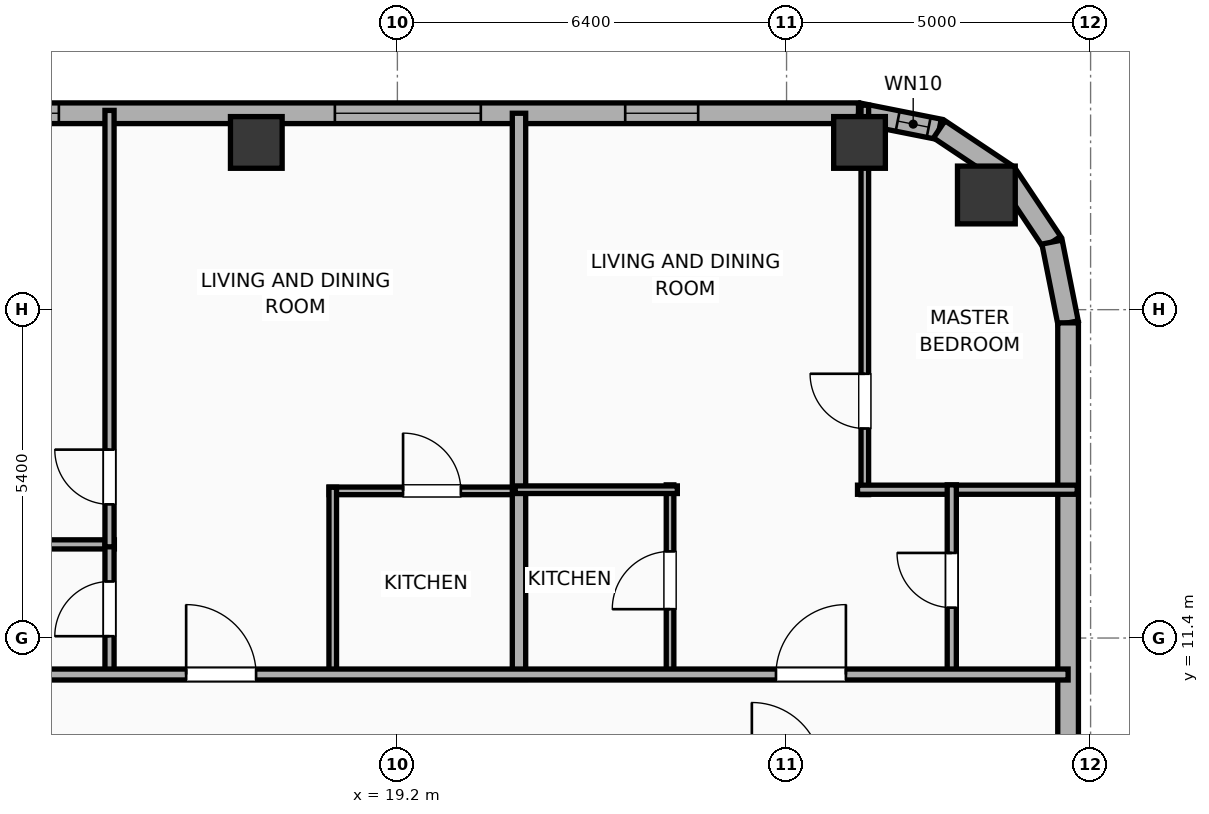
"""IFC4 building model, lengths in metres.
Left out: names, types, materials, properties, quantities, classifications, styles, units other than length and angle.
Written with IfcOpenShell. Run it as: python <this file> out.ifc"""

import sys

from ifc_helpers import new_model, si_unit, direction, frame, frame_2d, origin, origin_2d, place, context, subcontext, project, spatial, rectangle, hollow_rectangle, hollow_circle, extrude, element, fill, save


model = new_model("IFC4")
c1 = context("Model", 3, precision=1e-05, world=origin(), true_north=direction((0.0, 1.0)))
c2 = subcontext(c1, "Body", "Model", "MODEL_VIEW")
j1 = project(units=[si_unit("LENGTHUNIT", "METRE"), si_unit("PLANEANGLEUNIT", "RADIAN")], contexts=[c1])
p1 = place(None, origin())
s1 = spatial("IfcSite", under=j1, at=p1, CompositionType="ELEMENT")
p2 = place(p1, origin())
s2 = spatial("IfcBuilding", under=s1, at=p2, CompositionType="ELEMENT")
p3 = place(p2, frame((0.0, 0.0, 219.7)))
s3 = spatial("IfcBuildingStorey", under=s2, at=p3, CompositionType="ELEMENT", Elevation=219.7)
p4 = place(p3, frame((28.886, 18.686, 0.0), z_axis=(0.0, 0.0, 1.0), x_axis=(1.0, 0.0, 0.0)))
e1 = element("IfcColumn", 1, at=p4, inside=s3, PredefinedType="COLUMN", context=c2, shape_type="SweptSolid", body=[
    extrude(hollow_circle(Radius=0.475, WallThickness=0.032, at=origin_2d()), origin(), (0.0, 0.0, 1.0), 3.9),
])
for number, where, z_axis, x_axis in (
    (2, (26.8, 19.55, 0.0), (0.0, 0.0, 1.0), (1.0, 0.0, 0.0)),
    (3, (16.88, 19.55, 0.0), (0.0, 0.0, 1.0), (1.0, 0.0, 0.0)),
):
    element("IfcColumn", number, at=place(p3, frame(where, z_axis=z_axis, x_axis=x_axis)), inside=s3, PredefinedType="COLUMN", context=c2, shape_type="SweptSolid", body=[
        extrude(hollow_rectangle(XDim=0.85, YDim=0.85, WallThickness=0.028, at=origin_2d()), origin(), (0.0, 0.0, 1.0), 3.9),
    ])
p5 = place(p3, frame((-22.783, 20.03, 0.0), z_axis=(0.0, 0.0, 1.0), x_axis=(1.0, 0.0, 0.0)))
e4 = element("IfcWall", 4, at=p5, inside=s3, PredefinedType="ELEMENTEDWALL", context=c2, shape_type="SweptSolid", body=[
    extrude(rectangle(XDim=49.566, YDim=0.34, at=frame_2d((24.783, 0.0))), origin(), (0.0, 0.0, 1.0), 3.65),
])
p6 = place(p5, frame((40.956, 0.0, 0.75)))
e5 = element("IfcOpeningElement", 5, at=p6, cuts=e4, PredefinedType="OPENING", context=c2, shape_type="SweptSolid", body=[
    extrude(rectangle(XDim=2.4, YDim=2.1, at=frame_2d((1.2, 1.05))), frame((0.0, 0.18, 0.0), z_axis=(0.0, -1.0, 0.0), x_axis=(1.0, 0.0, 0.0)), (0.0, 0.0, 1.0), 0.36),
])
p7 = place(p5, frame((1.437, 0.0, 0.75)))
e6 = element("IfcOpeningElement", 6, at=p7, cuts=e4, PredefinedType="OPENING", context=c2, shape_type="SweptSolid", body=[
    extrude(rectangle(XDim=1.2, YDim=2.05, at=frame_2d((0.6, 1.025))), frame((0.0, 0.18, 0.0), z_axis=(0.0, -1.0, 0.0), x_axis=(1.0, 0.0, 0.0)), (0.0, 0.0, 1.0), 0.36),
])
p8 = place(p5, frame((7.619, 0.0, 0.75)))
e7 = element("IfcOpeningElement", 7, at=p8, cuts=e4, PredefinedType="OPENING", context=c2, shape_type="SweptSolid", body=[
    extrude(rectangle(XDim=1.2, YDim=2.05, at=frame_2d((0.6, 1.025))), frame((0.0, 0.18, 0.0), z_axis=(0.0, -1.0, 0.0), x_axis=(1.0, 0.0, 0.0)), (0.0, 0.0, 1.0), 0.36),
])
p9 = place(p5, frame((4.124, 0.0, 0.75)))
e8 = element("IfcOpeningElement", 8, at=p9, cuts=e4, PredefinedType="OPENING", context=c2, shape_type="SweptSolid", body=[
    extrude(rectangle(XDim=1.2, YDim=2.05, at=frame_2d((0.6, 1.025))), frame((0.0, 0.18, 0.0), z_axis=(0.0, -1.0, 0.0), x_axis=(1.0, 0.0, 0.0)), (0.0, 0.0, 1.0), 0.36),
])
p10 = place(p5, frame((11.278, 0.0, 0.75)))
e9 = element("IfcOpeningElement", 9, at=p10, cuts=e4, PredefinedType="OPENING", context=c2, shape_type="SweptSolid", body=[
    extrude(rectangle(XDim=1.2, YDim=2.05, at=frame_2d((0.6, 1.025))), frame((0.0, 0.18, 0.0), z_axis=(0.0, -1.0, 0.0), x_axis=(1.0, 0.0, 0.0)), (0.0, 0.0, 1.0), 0.36),
])
p11 = place(p5, frame((17.953, 0.0, 0.75)))
e10 = element("IfcOpeningElement", 10, at=p11, cuts=e4, PredefinedType="OPENING", context=c2, shape_type="SweptSolid", body=[
    extrude(rectangle(XDim=1.2, YDim=2.05, at=frame_2d((0.6, 1.025))), frame((0.0, 0.18, 0.0), z_axis=(0.0, -1.0, 0.0), x_axis=(1.0, 0.0, 0.0)), (0.0, 0.0, 1.0), 0.36),
])
p12 = place(p5, frame((14.738, 0.0, 0.75)))
e11 = element("IfcOpeningElement", 11, at=p12, cuts=e4, PredefinedType="OPENING", context=c2, shape_type="SweptSolid", body=[
    extrude(rectangle(XDim=1.2, YDim=2.05, at=frame_2d((0.6, 1.025))), frame((0.0, 0.18, 0.0), z_axis=(0.0, -1.0, 0.0), x_axis=(1.0, 0.0, 0.0)), (0.0, 0.0, 1.0), 0.36),
])
p13 = place(p5, frame((21.878, 0.0, 0.75)))
e12 = element("IfcOpeningElement", 12, at=p13, cuts=e4, PredefinedType="OPENING", context=c2, shape_type="SweptSolid", body=[
    extrude(rectangle(XDim=1.2, YDim=2.05, at=frame_2d((0.6, 1.025))), frame((0.0, 0.18, 0.0), z_axis=(0.0, -1.0, 0.0), x_axis=(1.0, 0.0, 0.0)), (0.0, 0.0, 1.0), 0.36),
])
p14 = place(p5, frame((27.878, 0.0, 0.75)))
e13 = element("IfcOpeningElement", 13, at=p14, cuts=e4, PredefinedType="OPENING", context=c2, shape_type="SweptSolid", body=[
    extrude(rectangle(XDim=1.2, YDim=2.05, at=frame_2d((0.6, 1.025))), frame((0.0, 0.18, 0.0), z_axis=(0.0, -1.0, 0.0), x_axis=(1.0, 0.0, 0.0)), (0.0, 0.0, 1.0), 0.36),
])
p15 = place(p5, frame((24.863, 0.0, 0.75)))
e14 = element("IfcOpeningElement", 14, at=p15, cuts=e4, PredefinedType="OPENING", context=c2, shape_type="SweptSolid", body=[
    extrude(rectangle(XDim=1.2, YDim=2.05, at=frame_2d((0.6, 1.025))), frame((0.0, 0.18, 0.0), z_axis=(0.0, -1.0, 0.0), x_axis=(1.0, 0.0, 0.0)), (0.0, 0.0, 1.0), 0.36),
])
p16 = place(p5, frame((32.078, 0.0, 0.75)))
e15 = element("IfcOpeningElement", 15, at=p16, cuts=e4, PredefinedType="OPENING", context=c2, shape_type="SweptSolid", body=[
    extrude(rectangle(XDim=1.2, YDim=2.05, at=frame_2d((0.6, 1.025))), frame((0.0, 0.18, 0.0), z_axis=(0.0, -1.0, 0.0), x_axis=(1.0, 0.0, 0.0)), (0.0, 0.0, 1.0), 0.36),
])
p17 = place(p5, frame((35.216, 0.0, 0.75)))
e16 = element("IfcOpeningElement", 16, at=p17, cuts=e4, PredefinedType="OPENING", context=c2, shape_type="SweptSolid", body=[
    extrude(rectangle(XDim=1.2, YDim=2.05, at=frame_2d((0.6, 1.025))), frame((0.0, 0.18, 0.0), z_axis=(0.0, -1.0, 0.0), x_axis=(1.0, 0.0, 0.0)), (0.0, 0.0, 1.0), 0.36),
])
p18 = place(p5, frame((45.73, 0.0, 0.75)))
e17 = element("IfcOpeningElement", 17, at=p18, cuts=e4, PredefinedType="OPENING", context=c2, shape_type="SweptSolid", body=[
    extrude(rectangle(XDim=1.2, YDim=2.05, at=frame_2d((0.6, 1.025))), frame((0.0, 0.18, 0.0), z_axis=(0.0, -1.0, 0.0), x_axis=(1.0, 0.0, 0.0)), (0.0, 0.0, 1.0), 0.36),
])
p19 = place(p3, frame((26.783, 20.03, 0.0), z_axis=(0.0, 0.0, 1.0), x_axis=(0.980788153188, -0.195075878998, 0.0)))
e18 = element("IfcWall", 18, at=p19, inside=s3, PredefinedType="ELEMENTEDWALL", context=c2, shape_type="SweptSolid", body=[
    extrude(rectangle(XDim=1.354, YDim=0.34, at=frame_2d((0.677, 0.0))), origin(), (0.0, 0.0, 1.0), 3.65),
])
p20 = place(p19, frame((0.657, 0.0, 0.75)))
e19 = element("IfcOpeningElement", 19, at=p20, cuts=e18, PredefinedType="OPENING", context=c2, shape_type="SweptSolid", body=[
    extrude(rectangle(XDim=0.52, YDim=2.05, at=frame_2d((0.26, 1.025))), frame((0.0, 0.18, 0.0), z_axis=(0.0, -1.0, 0.0), x_axis=(1.0, 0.0, 0.0)), (0.0, 0.0, 1.0), 0.36),
])
for number, where, z_axis, x_axis in (
    (20, (28.111, 19.766, 0.0), (0.0, 0.0, 1.0), (0.831, -0.556, 0.0)),
    (21, (29.223, 19.023, 0.0), (0.0, 0.0, 1.0), (0.556, -0.831, 0.0)),
):
    element("IfcWall", number, at=place(p3, frame(where, z_axis=z_axis, x_axis=x_axis)), inside=s3, PredefinedType="ELEMENTEDWALL", context=c2, shape_type="SweptSolid", body=[
        extrude(rectangle(XDim=1.337, YDim=0.34, at=frame_2d((0.668, 0.0))), origin(), (0.0, 0.0, 1.0), 3.65),
    ])
p21 = place(p3, frame((29.966, 17.911, 0.0), z_axis=(0.0, 0.0, 1.0), x_axis=(0.195075878998, -0.980788153188, 0.0)))
e22 = element("IfcWall", 22, at=p21, inside=s3, PredefinedType="ELEMENTEDWALL", context=c2, shape_type="SweptSolid", body=[
    extrude(rectangle(XDim=1.354, YDim=0.34, at=frame_2d((0.677, 0.0))), origin(), (0.0, 0.0, 1.0), 3.65),
])
p22 = place(p3, frame((30.23, 16.583, 0.0), z_axis=(0.0, 0.0, 1.0), x_axis=(0.0, -1.0, 0.0)))
e23 = element("IfcWall", 23, at=p22, inside=s3, PredefinedType="ELEMENTEDWALL", context=c2, shape_type="SweptSolid", body=[
    extrude(rectangle(XDim=31.967, YDim=0.34, at=frame_2d((15.983, 0.0))), origin(), (0.0, 0.0, 1.0), 3.65),
])
p23 = place(p22, frame((30.132, 0.0, 0.75)))
e24 = element("IfcOpeningElement", 24, at=p23, cuts=e23, PredefinedType="OPENING", context=c2, shape_type="SweptSolid", body=[
    extrude(rectangle(XDim=1.2, YDim=2.05, at=frame_2d((0.6, 1.025))), frame((0.0, 0.18, 0.0), z_axis=(0.0, -1.0, 0.0), x_axis=(1.0, 0.0, 0.0)), (0.0, 0.0, 1.0), 0.36),
])
p24 = place(p22, frame((11.288, 0.0, 0.75)))
e25 = element("IfcOpeningElement", 25, at=p24, cuts=e23, PredefinedType="OPENING", context=c2, shape_type="SweptSolid", body=[
    extrude(rectangle(XDim=1.2, YDim=2.05, at=frame_2d((0.6, 1.025))), frame((0.0, 0.18, 0.0), z_axis=(0.0, -1.0, 0.0), x_axis=(1.0, 0.0, 0.0)), (0.0, 0.0, 1.0), 0.36),
])
p25 = place(p22, frame((20.538, 0.0, 0.75)))
e26 = element("IfcOpeningElement", 26, at=p25, cuts=e23, PredefinedType="OPENING", context=c2, shape_type="SweptSolid", body=[
    extrude(rectangle(XDim=1.2, YDim=2.05, at=frame_2d((0.6, 1.025))), frame((0.0, 0.18, 0.0), z_axis=(0.0, -1.0, 0.0), x_axis=(1.0, 0.0, 0.0)), (0.0, 0.0, 1.0), 0.36),
])
p26 = place(p3, frame((11.34, 12.94, 0.0), z_axis=(0.0, 0.0, 1.0), x_axis=(1.0, 0.0, 0.0)))
e27 = element("IfcWall", 27, at=p26, inside=s3, PredefinedType="PLUMBINGWALL", context=c2, shape_type="SweptSolid", body=[
    extrude(rectangle(XDim=3.206, YDim=0.15, at=frame_2d((1.603, 0.0))), origin(), (0.0, 0.0, 1.0), 3.65),
])
p27 = place(p3, frame((14.466, 10.78, 0.0), z_axis=(0.0, 0.0, 1.0), x_axis=(0.0, 1.0, 0.0)))
e28 = element("IfcWall", 28, at=p27, inside=s3, PredefinedType="PLUMBINGWALL", context=c2, shape_type="SweptSolid", body=[
    extrude(rectangle(XDim=2.2, YDim=0.15, at=frame_2d((1.1, 0.0))), origin(), (0.0, 0.0, 1.0), 3.65),
])
p28 = place(p27, frame((0.65, 0.0, 0.0)))
e29 = element("IfcOpeningElement", 29, at=p28, cuts=e28, PredefinedType="OPENING", context=c2, shape_type="SweptSolid", body=[
    extrude(rectangle(XDim=0.9, YDim=2.05, at=frame_2d((0.45, 1.025))), frame((0.0, 0.085, 0.0), z_axis=(0.0, -1.0, 0.0), x_axis=(1.0, 0.0, 0.0)), (0.0, 0.0, 1.0), 0.17),
])
p29 = place(p3, frame((14.466, 12.9, 0.0), z_axis=(0.0, 0.0, 1.0), x_axis=(0.0, 1.0, 0.0)))
e30 = element("IfcWall", 30, at=p29, inside=s3, PredefinedType="PLUMBINGWALL", context=c2, shape_type="SweptSolid", body=[
    extrude(rectangle(XDim=7.177, YDim=0.15, at=frame_2d((3.588, 0.0))), origin(), (0.0, 0.0, 1.0), 3.65),
])
p30 = place(p29, frame((0.698, 0.0, 0.0)))
e31 = element("IfcOpeningElement", 31, at=p30, cuts=e30, PredefinedType="OPENING", context=c2, shape_type="SweptSolid", body=[
    extrude(rectangle(XDim=0.9, YDim=2.05, at=frame_2d((0.45, 1.025))), frame((0.0, 0.085, 0.0), z_axis=(0.0, -1.0, 0.0), x_axis=(1.0, 0.0, 0.0)), (0.0, 0.0, 1.0), 0.17),
])
p31 = place(p3, frame((18.077, 13.82, 0.0), z_axis=(0.0, 0.0, 1.0), x_axis=(1.0, 0.0, 0.0)))
e32 = element("IfcWall", 32, at=p31, inside=s3, PredefinedType="PARTITIONING", context=c2, shape_type="SweptSolid", body=[
    extrude(rectangle(XDim=3.186, YDim=0.125, at=frame_2d((1.593, 0.0))), origin(), (0.0, 0.0, 1.0), 3.65),
])
p32 = place(p31, frame((1.217, 0.0, 0.0)))
e33 = element("IfcOpeningElement", 33, at=p32, cuts=e32, PredefinedType="OPENING", context=c2, shape_type="SweptSolid", body=[
    extrude(rectangle(XDim=0.95, YDim=2.05, at=frame_2d((0.475, 1.025))), frame((0.0, 0.073, 0.0), z_axis=(0.0, -1.0, 0.0), x_axis=(1.0, 0.0, 0.0)), (0.0, 0.0, 1.0), 0.145),
])
p33 = place(p3, frame((18.137, 10.78, 0.0), z_axis=(0.0, 0.0, 1.0), x_axis=(0.0, 1.0, 0.0)))
e34 = element("IfcWall", 34, at=p33, inside=s3, PredefinedType="PARTITIONING", context=c2, shape_type="SweptSolid", body=[
    extrude(rectangle(XDim=3.1, YDim=0.125, at=frame_2d((1.55, 0.0))), origin(), (0.0, 0.0, 1.0), 3.65),
])
p34 = place(p3, frame((21.2, 10.72, 0.0), z_axis=(0.0, 0.0, 1.0), x_axis=(0.0, 1.0, 0.0)))
e35 = element("IfcWall", 35, at=p34, inside=s3, PredefinedType="PARTITIONING", context=c2, shape_type="SweptSolid", body=[
    extrude(rectangle(XDim=9.31, YDim=0.22, at=frame_2d((4.655, 0.0))), origin(), (0.0, 0.0, 1.0), 3.65),
])
p35 = place(p3, frame((26.887, 13.759, 0.0), z_axis=(0.0, 0.0, 1.0), x_axis=(0.0, 1.0, 0.0)))
e36 = element("IfcWall", 36, at=p35, inside=s3, PredefinedType="PARTITIONING", context=c2, shape_type="SweptSolid", body=[
    extrude(rectangle(XDim=6.403, YDim=0.125, at=frame_2d((3.202, 0.0))), origin(), (0.0, 0.0, 1.0), 3.65),
])
p36 = place(p35, frame((1.087, 0.0, 0.0)))
e37 = element("IfcOpeningElement", 37, at=p36, cuts=e36, PredefinedType="OPENING", context=c2, shape_type="SweptSolid", body=[
    extrude(rectangle(XDim=0.9, YDim=2.05, at=frame_2d((0.45, 1.025))), frame((0.0, 0.073, 0.0), z_axis=(0.0, -1.0, 0.0), x_axis=(1.0, 0.0, 0.0)), (0.0, 0.0, 1.0), 0.145),
])
p37 = place(p3, frame((26.767, 13.839, 0.0), z_axis=(0.0, 0.0, 1.0), x_axis=(1.0, 0.0, 0.0)))
e38 = element("IfcWall", 38, at=p37, inside=s3, PredefinedType="PLUMBINGWALL", context=c2, shape_type="SweptSolid", body=[
    extrude(rectangle(XDim=3.613, YDim=0.15, at=frame_2d((1.806, 0.0))), origin(), (0.0, 0.0, 1.0), 3.65),
])
p38 = place(p3, frame((23.684, 10.78, 0.0), z_axis=(0.0, 0.0, 1.0), x_axis=(0.0, 1.0, 0.0)))
e39 = element("IfcWall", 39, at=p38, inside=s3, PredefinedType="PARTITIONING", context=c2, shape_type="SweptSolid", body=[
    extrude(rectangle(XDim=3.139, YDim=0.125, at=frame_2d((1.569, 0.0))), origin(), (0.0, 0.0, 1.0), 3.65),
])
p39 = place(p38, frame((1.094, 0.0, 0.0)))
e40 = element("IfcOpeningElement", 40, at=p39, cuts=e39, PredefinedType="OPENING", context=c2, shape_type="SweptSolid", body=[
    extrude(rectangle(XDim=0.95, YDim=2.05, at=frame_2d((0.475, 1.025))), frame((0.0, 0.073, 0.0), z_axis=(0.0, -1.0, 0.0), x_axis=(1.0, 0.0, 0.0)), (0.0, 0.0, 1.0), 0.145),
])
p40 = place(p3, frame((21.137, 13.839, 0.0), z_axis=(0.0, 0.0, 1.0), x_axis=(1.0, 0.0, 0.0)))
e41 = element("IfcWall", 41, at=p40, inside=s3, PredefinedType="PARTITIONING", context=c2, shape_type="SweptSolid", body=[
    extrude(rectangle(XDim=2.667, YDim=0.125, at=frame_2d((1.333, 0.0))), origin(), (0.0, 0.0, 1.0), 3.65),
])
p41 = place(p3, frame((28.317, 10.78, 0.0), z_axis=(0.0, 0.0, 1.0), x_axis=(0.0, 1.0, 0.0)))
e42 = element("IfcWall", 42, at=p41, inside=s3, PredefinedType="PLUMBINGWALL", context=c2, shape_type="SweptSolid", body=[
    extrude(rectangle(XDim=3.139, YDim=0.15, at=frame_2d((1.569, 0.0))), origin(), (0.0, 0.0, 1.0), 3.65),
])
p42 = place(p41, frame((1.119, 0.0, 0.0)))
e43 = element("IfcOpeningElement", 43, at=p42, cuts=e42, PredefinedType="OPENING", context=c2, shape_type="SweptSolid", body=[
    extrude(rectangle(XDim=0.9, YDim=2.05, at=frame_2d((0.45, 1.025))), frame((0.0, 0.085, 0.0), z_axis=(0.0, -1.0, 0.0), x_axis=(1.0, 0.0, 0.0)), (0.0, 0.0, 1.0), 0.17),
])
p43 = place(p3, frame((-26.23, 10.8, 0.0), z_axis=(0.0, 0.0, 1.0), x_axis=(1.0, 0.0, 0.0)))
e44 = element("IfcWall", 44, at=p43, inside=s3, PredefinedType="PARTITIONING", context=c2, shape_type="SweptSolid", body=[
    extrude(rectangle(XDim=56.46, YDim=0.18, at=frame_2d((28.23, 0.0))), origin(), (0.0, 0.0, 1.0), 3.65),
])
p44 = place(p43, frame((2.994, 0.0, 0.0)))
e45 = element("IfcOpeningElement", 45, at=p44, cuts=e44, PredefinedType="OPENING", context=c2, shape_type="SweptSolid", body=[
    extrude(rectangle(XDim=0.9, YDim=2.05, at=frame_2d((0.45, 1.025))), frame((0.0, 0.1, 0.0), z_axis=(0.0, -1.0, 0.0), x_axis=(1.0, 0.0, 0.0)), (0.0, 0.0, 1.0), 0.2),
])
p45 = place(p43, frame((11.745, 0.0, 0.0)))
e46 = element("IfcOpeningElement", 46, at=p45, cuts=e44, PredefinedType="OPENING", context=c2, shape_type="SweptSolid", body=[
    extrude(rectangle(XDim=1.15, YDim=2.05, at=frame_2d((0.575, 1.025))), frame((0.0, 0.1, 0.0), z_axis=(0.0, -1.0, 0.0), x_axis=(1.0, 0.0, 0.0)), (0.0, 0.0, 1.0), 0.2),
])
p46 = place(p43, frame((21.907, 0.0, 0.0)))
e47 = element("IfcOpeningElement", 47, at=p46, cuts=e44, PredefinedType="OPENING", context=c2, shape_type="SweptSolid", body=[
    extrude(rectangle(XDim=1.15, YDim=2.05, at=frame_2d((0.575, 1.025))), frame((0.0, 0.1, 0.0), z_axis=(0.0, -1.0, 0.0), x_axis=(1.0, 0.0, 0.0)), (0.0, 0.0, 1.0), 0.2),
])
p47 = place(p43, frame((32.516, 0.0, 0.0)))
e48 = element("IfcOpeningElement", 48, at=p47, cuts=e44, PredefinedType="OPENING", context=c2, shape_type="SweptSolid", body=[
    extrude(rectangle(XDim=1.15, YDim=2.05, at=frame_2d((0.575, 1.025))), frame((0.0, 0.1, 0.0), z_axis=(0.0, -1.0, 0.0), x_axis=(1.0, 0.0, 0.0)), (0.0, 0.0, 1.0), 0.2),
])
p48 = place(p43, frame((41.956, 0.0, 0.0)))
e49 = element("IfcOpeningElement", 49, at=p48, cuts=e44, PredefinedType="OPENING", context=c2, shape_type="SweptSolid", body=[
    extrude(rectangle(XDim=1.15, YDim=2.05, at=frame_2d((0.575, 1.025))), frame((0.0, 0.1, 0.0), z_axis=(0.0, -1.0, 0.0), x_axis=(1.0, 0.0, 0.0)), (0.0, 0.0, 1.0), 0.2),
])
p49 = place(p43, frame((51.656, 0.0, 0.0)))
e50 = element("IfcOpeningElement", 50, at=p49, cuts=e44, PredefinedType="OPENING", context=c2, shape_type="SweptSolid", body=[
    extrude(rectangle(XDim=1.15, YDim=2.05, at=frame_2d((0.575, 1.025))), frame((0.0, 0.1, 0.0), z_axis=(0.0, -1.0, 0.0), x_axis=(1.0, 0.0, 0.0)), (0.0, 0.0, 1.0), 0.2),
])
p50 = place(p6, origin())
e51 = element("IfcWindow", 51, at=p50, inside=s3, PartitioningType="SINGLE_PANEL", PredefinedType="WINDOW", context=c2, shape_type="SweptSolid", body=[
    extrude(rectangle(XDim=2.4, YDim=2.1, at=frame_2d((1.2, 1.05))), frame((0.0, 0.03, 0.0), z_axis=(0.0, -1.0, 0.0), x_axis=(1.0, 0.0, 0.0)), (0.0, 0.0, 1.0), 0.06),
])
fill(e5, e51)
p51 = place(p17, origin())
e52 = element("IfcWindow", 52, at=p51, inside=s3, PartitioningType="SINGLE_PANEL", PredefinedType="WINDOW", context=c2, shape_type="SweptSolid", body=[
    extrude(rectangle(XDim=1.2, YDim=2.05, at=frame_2d((0.6, 1.025))), frame((0.0, 0.03, 0.0), z_axis=(0.0, -1.0, 0.0), x_axis=(1.0, 0.0, 0.0)), (0.0, 0.0, 1.0), 0.06),
])
fill(e16, e52)
p52 = place(p18, origin())
e53 = element("IfcWindow", 53, at=p52, inside=s3, PartitioningType="SINGLE_PANEL", PredefinedType="WINDOW", context=c2, shape_type="SweptSolid", body=[
    extrude(rectangle(XDim=1.2, YDim=2.05, at=frame_2d((0.6, 1.025))), frame((0.0, 0.03, 0.0), z_axis=(0.0, -1.0, 0.0), x_axis=(1.0, 0.0, 0.0)), (0.0, 0.0, 1.0), 0.06),
])
fill(e17, e53)
p53 = place(p20, origin())
e54 = element("IfcWindow", 54, at=p53, inside=s3, PartitioningType="SINGLE_PANEL", PredefinedType="WINDOW", context=c2, shape_type="SweptSolid", body=[
    extrude(rectangle(XDim=0.52, YDim=2.05, at=frame_2d((0.26, 1.025))), frame((0.0, 0.03, 0.0), z_axis=(0.0, -1.0, 0.0), x_axis=(1.0, 0.0, 0.0)), (0.0, 0.0, 1.0), 0.06),
])
fill(e19, e54)
p54 = place(p28, origin())
e55 = element("IfcDoor", 55, at=p54, inside=s3, OperationType="SINGLE_SWING_LEFT", PredefinedType="DOOR", context=c2, shape_type="SweptSolid", body=[
    extrude(rectangle(XDim=0.9, YDim=2.05, at=frame_2d((0.45, 1.025))), frame((0.0, 0.025, 0.0), z_axis=(0.0, -1.0, 0.0), x_axis=(1.0, 0.0, 0.0)), (0.0, 0.0, 1.0), 0.05),
])
fill(e29, e55)
p55 = place(p30, origin())
e56 = element("IfcDoor", 56, at=p55, inside=s3, OperationType="SINGLE_SWING_RIGHT", PredefinedType="DOOR", context=c2, shape_type="SweptSolid", body=[
    extrude(rectangle(XDim=0.9, YDim=2.05, at=frame_2d((0.45, 1.025))), frame((0.0, 0.025, 0.0), z_axis=(0.0, -1.0, 0.0), x_axis=(1.0, 0.0, 0.0)), (0.0, 0.0, 1.0), 0.05),
])
fill(e31, e56)
p56 = place(p32, origin())
e57 = element("IfcDoor", 57, at=p56, inside=s3, OperationType="SINGLE_SWING_LEFT", PredefinedType="DOOR", context=c2, shape_type="SweptSolid", body=[
    extrude(rectangle(XDim=0.95, YDim=2.05, at=frame_2d((0.475, 1.025))), frame((0.0, 0.025, 0.0), z_axis=(0.0, -1.0, 0.0), x_axis=(1.0, 0.0, 0.0)), (0.0, 0.0, 1.0), 0.05),
])
fill(e33, e57)
p57 = place(p36, origin())
e58 = element("IfcDoor", 58, at=p57, inside=s3, OperationType="SINGLE_SWING_RIGHT", PredefinedType="DOOR", context=c2, shape_type="SweptSolid", body=[
    extrude(rectangle(XDim=0.9, YDim=2.05, at=frame_2d((0.45, 1.025))), frame((0.0, 0.025, 0.0), z_axis=(0.0, -1.0, 0.0), x_axis=(1.0, 0.0, 0.0)), (0.0, 0.0, 1.0), 0.05),
])
fill(e37, e58)
p58 = place(p39, origin())
e59 = element("IfcDoor", 59, at=p58, inside=s3, OperationType="SINGLE_SWING_LEFT", PredefinedType="DOOR", context=c2, shape_type="SweptSolid", body=[
    extrude(rectangle(XDim=0.95, YDim=2.05, at=frame_2d((0.475, 1.025))), frame((0.0, 0.025, 0.0), z_axis=(0.0, -1.0, 0.0), x_axis=(1.0, 0.0, 0.0)), (0.0, 0.0, 1.0), 0.05),
])
fill(e40, e59)
p59 = place(p42, origin())
e60 = element("IfcDoor", 60, at=p59, inside=s3, OperationType="SINGLE_SWING_RIGHT", PredefinedType="DOOR", context=c2, shape_type="SweptSolid", body=[
    extrude(rectangle(XDim=0.9, YDim=2.05, at=frame_2d((0.45, 1.025))), frame((0.0, 0.025, 0.0), z_axis=(0.0, -1.0, 0.0), x_axis=(1.0, 0.0, 0.0)), (0.0, 0.0, 1.0), 0.05),
])
fill(e43, e60)
p60 = place(p48, origin())
e61 = element("IfcDoor", 61, at=p60, inside=s3, OperationType="SINGLE_SWING_LEFT", PredefinedType="DOOR", context=c2, shape_type="SweptSolid", body=[
    extrude(rectangle(XDim=1.15, YDim=2.05, at=frame_2d((0.575, 1.025))), frame((0.0, 0.025, 0.0), z_axis=(0.0, -1.0, 0.0), x_axis=(1.0, 0.0, 0.0)), (0.0, 0.0, 1.0), 0.05),
])
fill(e49, e61)
p61 = place(p49, origin())
e62 = element("IfcDoor", 62, at=p61, inside=s3, OperationType="SINGLE_SWING_RIGHT", PredefinedType="DOOR", context=c2, shape_type="SweptSolid", body=[
    extrude(rectangle(XDim=1.15, YDim=2.05, at=frame_2d((0.575, 1.025))), frame((0.0, 0.025, 0.0), z_axis=(0.0, -1.0, 0.0), x_axis=(1.0, 0.0, 0.0)), (0.0, 0.0, 1.0), 0.05),
])
fill(e50, e62)
save(model, sys.argv[1])
